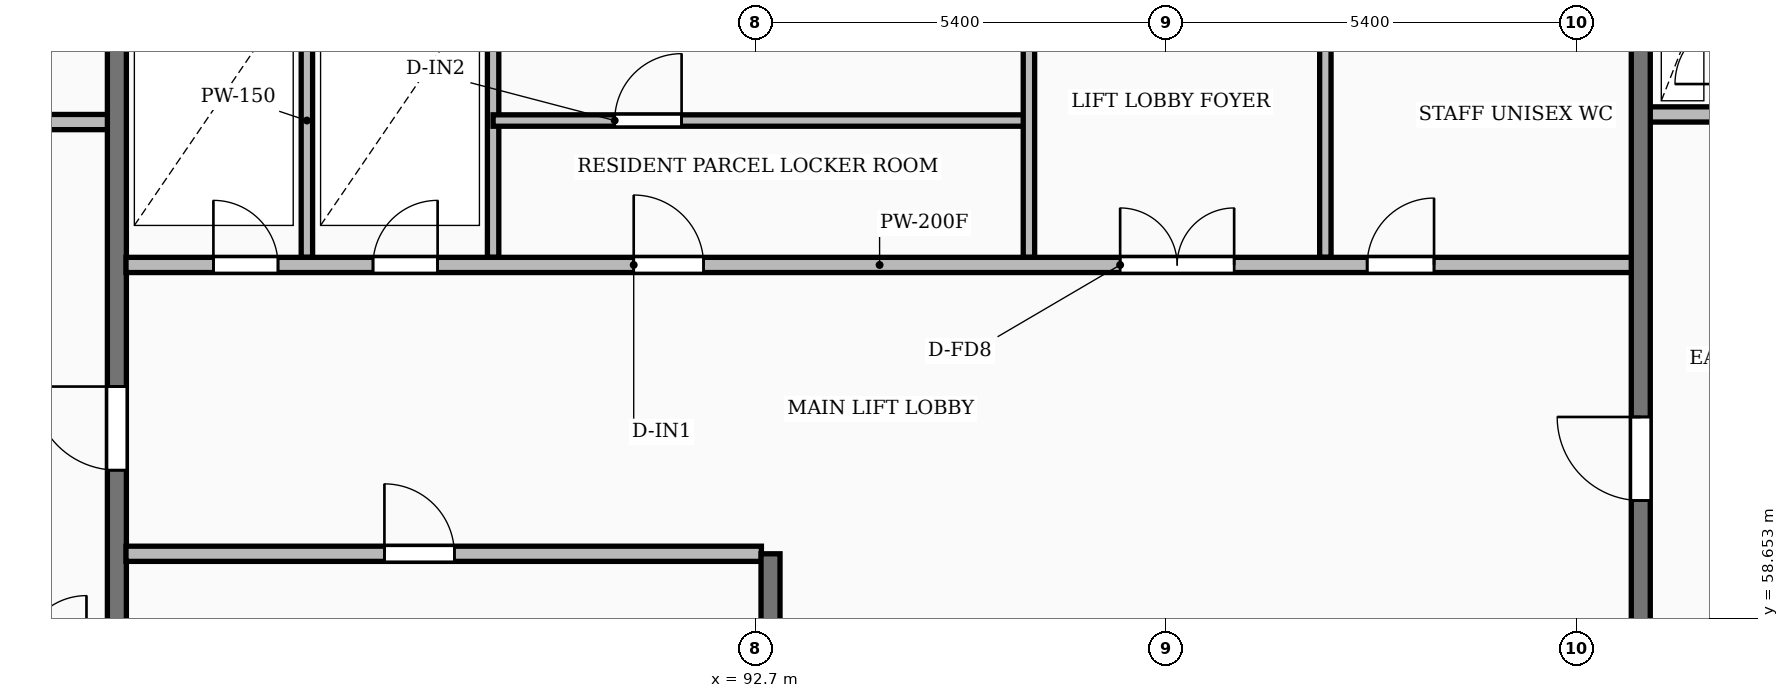
"""IFC4 building model, lengths in metres.
Left out: names, types, materials, properties, quantities, classifications, styles, units other than length and angle.
Written with IfcOpenShell. Run it as: python <this file> out.ifc"""

import sys

from ifc_helpers import new_model, si_unit, direction, frame, frame_2d, origin, place, context, subcontext, project, spatial, rectangle, extrude, element, fill, save


model = new_model("IFC4")
c1 = context("Model", 3, precision=1e-05, world=origin(), true_north=direction((0.0, 1.0)))
c2 = subcontext(c1, "Body", "Model", "MODEL_VIEW")
j1 = project(units=[si_unit("LENGTHUNIT", "METRE"), si_unit("PLANEANGLEUNIT", "RADIAN")], contexts=[c1])
p1 = place(None, origin())
s1 = spatial("IfcSite", under=j1, at=p1, CompositionType="ELEMENT")
p2 = place(p1, origin())
s2 = spatial("IfcBuilding", under=s1, at=p2, CompositionType="ELEMENT")
p3 = place(p2, frame((0.0, 0.0, 175.1)))
s3 = spatial("IfcBuildingStorey", under=s2, at=p3, CompositionType="ELEMENT", Elevation=175.1)
p4 = place(p3, frame((79.79, 65.18, 0.0), z_axis=(0.0, 0.0, 1.0), x_axis=(1.0, 0.0, 0.0)))
e1 = element("IfcWall", 1, at=p4, inside=s3, PredefinedType="PARTITIONING", context=c2, shape_type="SweptSolid", body=[
    extrude(rectangle(XDim=4.39, YDim=0.2, at=frame_2d((2.195, 0.0))), origin(), (0.0, 0.0, 1.0), 2.97),
])
p5 = place(p4, frame((1.5, 0.0, 0.0)))
e2 = element("IfcOpeningElement", 2, at=p5, cuts=e1, PredefinedType="OPENING", context=c2, shape_type="SweptSolid", body=[
    extrude(rectangle(XDim=1.1, YDim=2.1, at=frame_2d((0.55, 1.05))), frame((0.0, 0.11, 0.0), z_axis=(0.0, -1.0, 0.0), x_axis=(1.0, 0.0, 0.0)), (0.0, 0.0, 1.0), 0.22),
])
p6 = place(p3, frame((84.3, 55.4, 0.0), z_axis=(0.0, 0.0, 1.0), x_axis=(0.0, 1.0, 0.0)))
e3 = element("IfcWall", 3, at=p6, inside=s3, PredefinedType="SHEAR", context=c2, shape_type="SweptSolid", body=[
    extrude(rectangle(XDim=11.6, YDim=0.25, at=frame_2d((5.8, 0.0))), origin(), (0.0, 0.0, 1.0), 3.25),
])
p7 = place(p6, frame((5.2, 0.0, 0.0)))
e4 = element("IfcOpeningElement", 4, at=p7, cuts=e3, PredefinedType="OPENING", context=c2, shape_type="SweptSolid", body=[
    extrude(rectangle(XDim=1.1, YDim=2.1, at=frame_2d((0.55, 1.05))), frame((0.0, 0.135, 0.0), z_axis=(0.0, -1.0, 0.0), x_axis=(1.0, 0.0, 0.0)), (0.0, 0.0, 1.0), 0.27),
])
p8 = place(p3, frame((84.42, 59.5, 0.0), z_axis=(0.0, 0.0, 1.0), x_axis=(1.0, 0.0, 0.0)))
e5 = element("IfcWall", 5, at=p8, inside=s3, PredefinedType="PARTITIONING", context=c2, shape_type="SweptSolid", body=[
    extrude(rectangle(XDim=8.36, YDim=0.2, at=frame_2d((4.18, 0.0))), origin(), (0.0, 0.0, 1.0), 2.97),
])
p9 = place(p8, frame((3.4, 0.0, 0.0)))
e6 = element("IfcOpeningElement", 6, at=p9, cuts=e5, PredefinedType="OPENING", context=c2, shape_type="SweptSolid", body=[
    extrude(rectangle(XDim=0.92, YDim=2.08, at=frame_2d((0.46, 1.04))), frame((0.0, 0.11, 0.0), z_axis=(0.0, -1.0, 0.0), x_axis=(1.0, 0.0, 0.0)), (0.0, 0.0, 1.0), 0.22),
])
p10 = place(p3, frame((92.9, 55.4, 0.0), z_axis=(0.0, 0.0, 1.0), x_axis=(0.0, 1.0, 0.0)))
e7 = element("IfcWall", 7, at=p10, inside=s3, PredefinedType="SHEAR", context=c2, shape_type="SweptSolid", body=[
    extrude(rectangle(XDim=4.1, YDim=0.25, at=frame_2d((2.05, 0.0))), origin(), (0.0, 0.0, 1.0), 3.25),
])
for number, where, z_axis, x_axis in (
    (8, (86.8, 63.4, 0.0), (0.0, 0.0, 1.0), (0.0, 1.0, 0.0)),
    (9, (89.25, 63.4, 0.0), (0.0, 0.0, 1.0), (0.0, 1.0, 0.0)),
):
    element("IfcWall", number, at=place(p3, frame(where, z_axis=z_axis, x_axis=x_axis)), inside=s3, PredefinedType="PARTITIONING", context=c2, shape_type="SweptSolid", body=[
        extrude(rectangle(XDim=3.6, YDim=0.15, at=frame_2d((1.8, 0.0))), origin(), (0.0, 0.0, 1.0), 2.97),
    ])
p11 = place(p3, frame((89.25, 65.2, 0.0), z_axis=(0.0, 0.0, 1.0), x_axis=(1.0, 0.0, 0.0)))
e10 = element("IfcWall", 10, at=p11, inside=s3, PredefinedType="PARTITIONING", context=c2, shape_type="SweptSolid", body=[
    extrude(rectangle(XDim=7.05, YDim=0.15, at=frame_2d((3.525, 0.0))), origin(), (0.0, 0.0, 1.0), 2.97),
])
p12 = place(p11, frame((1.6, 0.0, 0.0)))
e11 = element("IfcOpeningElement", 11, at=p12, cuts=e10, PredefinedType="OPENING", context=c2, shape_type="SweptSolid", body=[
    extrude(rectangle(XDim=0.88, YDim=2.06, at=frame_2d((0.44, 1.03))), frame((0.0, 0.085, 0.0), z_axis=(0.0, -1.0, 0.0), x_axis=(1.0, 0.0, 0.0)), (0.0, 0.0, 1.0), 0.17),
])
for number, where, z_axis, x_axis in (
    (12, (96.3, 63.4, 0.0), (0.0, 0.0, 1.0), (0.0, 1.0, 0.0)),
    (13, (100.2, 63.4, 0.0), (0.0, 0.0, 1.0), (0.0, 1.0, 0.0)),
):
    element("IfcWall", number, at=place(p3, frame(where, z_axis=z_axis, x_axis=x_axis)), inside=s3, PredefinedType="PARTITIONING", context=c2, shape_type="SweptSolid", body=[
        extrude(rectangle(XDim=3.6, YDim=0.15, at=frame_2d((1.8, 0.0))), origin(), (0.0, 0.0, 1.0), 2.97),
    ])
p13 = place(p3, frame((84.42, 63.3, 0.0), z_axis=(0.0, 0.0, 1.0), x_axis=(1.0, 0.0, 0.0)))
e14 = element("IfcWall", 14, at=p13, inside=s3, PredefinedType="PARTITIONING", context=c2, shape_type="SweptSolid", body=[
    extrude(rectangle(XDim=19.83, YDim=0.2, at=frame_2d((9.915, 0.0))), origin(), (0.0, 0.0, 1.0), 2.97),
])
p14 = place(p13, frame((1.15, 0.0, 0.0)))
e15 = element("IfcOpeningElement", 15, at=p14, cuts=e14, PredefinedType="OPENING", context=c2, shape_type="SweptSolid", body=[
    extrude(rectangle(XDim=0.85, YDim=2.05, at=frame_2d((0.425, 1.025))), frame((0.0, 0.11, 0.0), z_axis=(0.0, -1.0, 0.0), x_axis=(1.0, 0.0, 0.0)), (0.0, 0.0, 1.0), 0.22),
])
p15 = place(p13, frame((3.25, 0.0, 0.0)))
e16 = element("IfcOpeningElement", 16, at=p15, cuts=e14, PredefinedType="OPENING", context=c2, shape_type="SweptSolid", body=[
    extrude(rectangle(XDim=0.85, YDim=2.05, at=frame_2d((0.425, 1.025))), frame((0.0, 0.11, 0.0), z_axis=(0.0, -1.0, 0.0), x_axis=(1.0, 0.0, 0.0)), (0.0, 0.0, 1.0), 0.22),
])
p16 = place(p13, frame((13.08, 0.0, 0.0)))
e17 = element("IfcOpeningElement", 17, at=p16, cuts=e14, PredefinedType="OPENING", context=c2, shape_type="SweptSolid", body=[
    extrude(rectangle(XDim=1.5, YDim=2.2, at=frame_2d((0.75, 1.1))), frame((0.0, 0.11, 0.0), z_axis=(0.0, -1.0, 0.0), x_axis=(1.0, 0.0, 0.0)), (0.0, 0.0, 1.0), 0.22),
])
p17 = place(p13, frame((6.68, 0.0, 0.0)))
e18 = element("IfcOpeningElement", 18, at=p17, cuts=e14, PredefinedType="OPENING", context=c2, shape_type="SweptSolid", body=[
    extrude(rectangle(XDim=0.92, YDim=2.08, at=frame_2d((0.46, 1.04))), frame((0.0, 0.11, 0.0), z_axis=(0.0, -1.0, 0.0), x_axis=(1.0, 0.0, 0.0)), (0.0, 0.0, 1.0), 0.22),
])
p18 = place(p13, frame((16.33, 0.0, 0.0)))
e19 = element("IfcOpeningElement", 19, at=p18, cuts=e14, PredefinedType="OPENING", context=c2, shape_type="SweptSolid", body=[
    extrude(rectangle(XDim=0.88, YDim=2.06, at=frame_2d((0.44, 1.03))), frame((0.0, 0.11, 0.0), z_axis=(0.0, -1.0, 0.0), x_axis=(1.0, 0.0, 0.0)), (0.0, 0.0, 1.0), 0.22),
])
p19 = place(p3, frame((104.45, 65.28, 0.0), z_axis=(0.0, 0.0, 1.0), x_axis=(1.0, 0.0, 0.0)))
e20 = element("IfcWall", 20, at=p19, inside=s3, PredefinedType="PARTITIONING", context=c2, shape_type="SweptSolid", body=[
    extrude(rectangle(XDim=1.2, YDim=0.2, at=frame_2d((0.6, 0.0))), origin(), (0.0, 0.0, 1.0), 2.97),
])
p20 = place(p3, frame((104.35, 58.4, 0.0), z_axis=(0.0, 0.0, 1.0), x_axis=(0.0, 1.0, 0.0)))
e21 = element("IfcWall", 21, at=p20, inside=s3, PredefinedType="SHEAR", context=c2, shape_type="SweptSolid", body=[
    extrude(rectangle(XDim=8.6, YDim=0.25, at=frame_2d((4.3, 0.0))), origin(), (0.0, 0.0, 1.0), 3.25),
])
p21 = place(p20, frame((1.8, 0.0, 0.0)))
e22 = element("IfcOpeningElement", 22, at=p21, cuts=e21, PredefinedType="OPENING", context=c2, shape_type="SweptSolid", body=[
    extrude(rectangle(XDim=1.1, YDim=2.1, at=frame_2d((0.55, 1.05))), frame((0.0, 0.135, 0.0), z_axis=(0.0, -1.0, 0.0), x_axis=(1.0, 0.0, 0.0)), (0.0, 0.0, 1.0), 0.27),
])
p22 = place(p7, origin())
e23 = element("IfcDoor", 23, at=p22, inside=s3, OperationType="SINGLE_SWING_RIGHT", PredefinedType="DOOR", context=c2, shape_type="SweptSolid", body=[
    extrude(rectangle(XDim=1.1, YDim=2.1, at=frame_2d((0.55, 1.05))), frame((0.0, 0.025, 0.0), z_axis=(0.0, -1.0, 0.0), x_axis=(1.0, 0.0, 0.0)), (0.0, 0.0, 1.0), 0.05),
])
fill(e4, e23)
p23 = place(p9, origin())
e24 = element("IfcDoor", 24, at=p23, inside=s3, OperationType="SINGLE_SWING_LEFT", PredefinedType="DOOR", context=c2, shape_type="SweptSolid", body=[
    extrude(rectangle(XDim=0.92, YDim=2.08, at=frame_2d((0.46, 1.04))), frame((0.0, 0.025, 0.0), z_axis=(0.0, -1.0, 0.0), x_axis=(1.0, 0.0, 0.0)), (0.0, 0.0, 1.0), 0.05),
])
fill(e6, e24)
p24 = place(p12, origin())
e25 = element("IfcDoor", 25, at=p24, inside=s3, OperationType="SINGLE_SWING_RIGHT", PredefinedType="DOOR", context=c2, shape_type="SweptSolid", body=[
    extrude(rectangle(XDim=0.88, YDim=2.06, at=frame_2d((0.44, 1.03))), frame((0.0, 0.025, 0.0), z_axis=(0.0, -1.0, 0.0), x_axis=(1.0, 0.0, 0.0)), (0.0, 0.0, 1.0), 0.05),
])
fill(e11, e25)
p25 = place(p14, origin())
e26 = element("IfcDoor", 26, at=p25, inside=s3, OperationType="SINGLE_SWING_LEFT", PredefinedType="DOOR", context=c2, shape_type="SweptSolid", body=[
    extrude(rectangle(XDim=0.85, YDim=2.05, at=frame_2d((0.425, 1.025))), frame((0.0, 0.025, 0.0), z_axis=(0.0, -1.0, 0.0), x_axis=(1.0, 0.0, 0.0)), (0.0, 0.0, 1.0), 0.05),
])
fill(e15, e26)
p26 = place(p15, origin())
e27 = element("IfcDoor", 27, at=p26, inside=s3, OperationType="SINGLE_SWING_RIGHT", PredefinedType="DOOR", context=c2, shape_type="SweptSolid", body=[
    extrude(rectangle(XDim=0.85, YDim=2.05, at=frame_2d((0.425, 1.025))), frame((0.0, 0.025, 0.0), z_axis=(0.0, -1.0, 0.0), x_axis=(1.0, 0.0, 0.0)), (0.0, 0.0, 1.0), 0.05),
])
fill(e16, e27)
p27 = place(p16, origin())
e28 = element("IfcDoor", 28, at=p27, inside=s3, OperationType="DOUBLE_DOOR_SINGLE_SWING", PredefinedType="DOOR", context=c2, shape_type="SweptSolid", body=[
    extrude(rectangle(XDim=1.5, YDim=2.2, at=frame_2d((0.75, 1.1))), frame((0.0, 0.025, 0.0), z_axis=(0.0, -1.0, 0.0), x_axis=(1.0, 0.0, 0.0)), (0.0, 0.0, 1.0), 0.05),
])
fill(e17, e28)
p28 = place(p17, origin())
e29 = element("IfcDoor", 29, at=p28, inside=s3, OperationType="SINGLE_SWING_LEFT", PredefinedType="DOOR", context=c2, shape_type="SweptSolid", body=[
    extrude(rectangle(XDim=0.92, YDim=2.08, at=frame_2d((0.46, 1.04))), frame((0.0, 0.025, 0.0), z_axis=(0.0, -1.0, 0.0), x_axis=(1.0, 0.0, 0.0)), (0.0, 0.0, 1.0), 0.05),
])
fill(e18, e29)
p29 = place(p18, origin())
e30 = element("IfcDoor", 30, at=p29, inside=s3, OperationType="SINGLE_SWING_RIGHT", PredefinedType="DOOR", context=c2, shape_type="SweptSolid", body=[
    extrude(rectangle(XDim=0.88, YDim=2.06, at=frame_2d((0.44, 1.03))), frame((0.0, 0.025, 0.0), z_axis=(0.0, -1.0, 0.0), x_axis=(1.0, 0.0, 0.0)), (0.0, 0.0, 1.0), 0.05),
])
fill(e19, e30)
p30 = place(p21, origin())
e31 = element("IfcDoor", 31, at=p30, inside=s3, OperationType="SINGLE_SWING_RIGHT", PredefinedType="DOOR", context=c2, shape_type="SweptSolid", body=[
    extrude(rectangle(XDim=1.1, YDim=2.1, at=frame_2d((0.55, 1.05))), frame((0.0, 0.025, 0.0), z_axis=(0.0, -1.0, 0.0), x_axis=(1.0, 0.0, 0.0)), (0.0, 0.0, 1.0), 0.05),
])
fill(e22, e31)
save(model, sys.argv[1])
